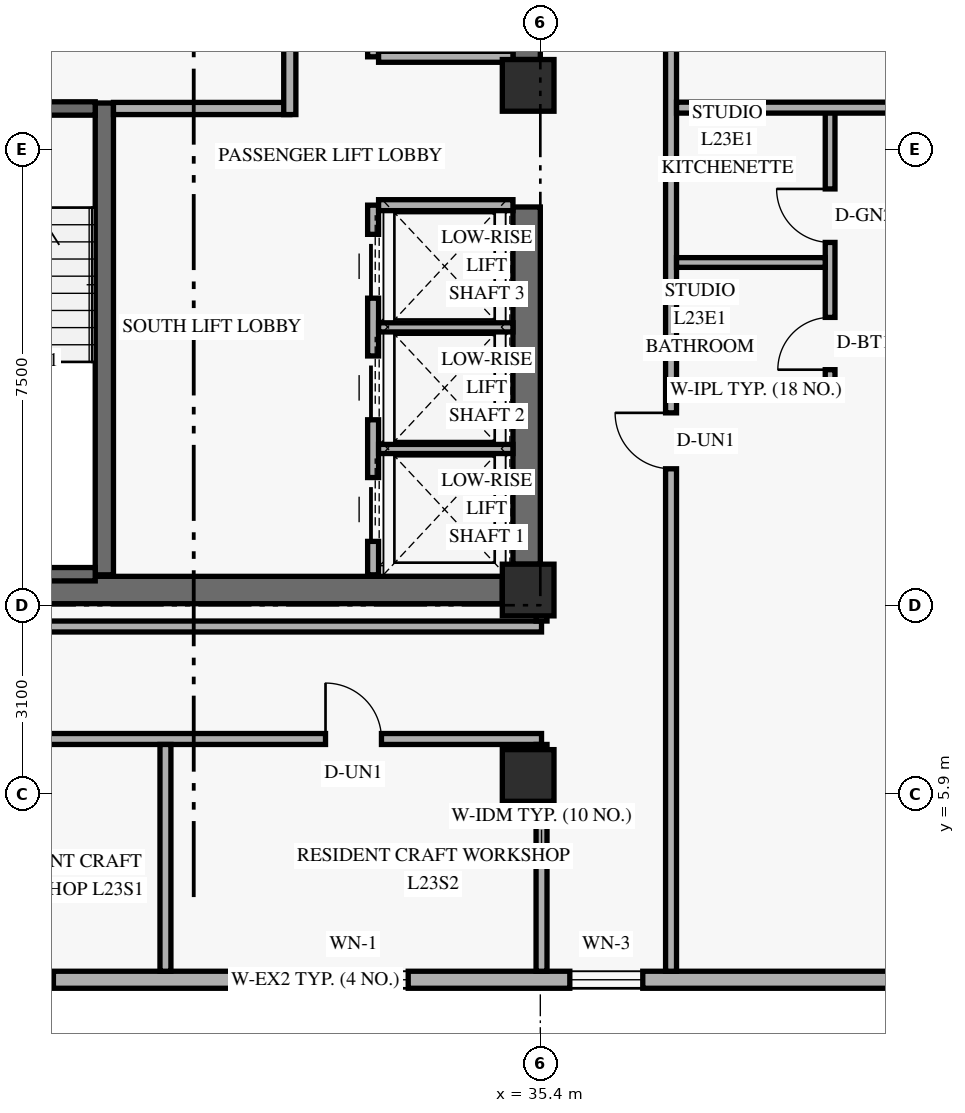
"""IFC4 building model, lengths in metres.
Left out: names, types, materials, properties, quantities, classifications, styles, units other than length and angle.
Written with IfcOpenShell. Run it as: python <this file> out.ifc"""

import sys

from ifc_helpers import new_model, si_unit, direction, frame, frame_2d, origin, origin_2d, place, context, subcontext, project, spatial, rectangle, extrude, element, fill, save


model = new_model("IFC4")
c1 = context("Model", 3, precision=1e-05, world=origin(), true_north=direction((0.0, 1.0)))
c2 = subcontext(c1, "Body", "Model", "MODEL_VIEW")
j1 = project(units=[si_unit("LENGTHUNIT", "METRE"), si_unit("PLANEANGLEUNIT", "RADIAN")], contexts=[c1])
p1 = place(None, origin())
s1 = spatial("IfcSite", under=j1, at=p1, CompositionType="ELEMENT")
p2 = place(p1, origin())
s2 = spatial("IfcBuilding", under=s1, at=p2, CompositionType="ELEMENT")
p3 = place(p2, frame((0.0, 0.0, 91.2)))
s3 = spatial("IfcBuildingStorey", under=s2, at=p3, CompositionType="ELEMENT", Elevation=91.2)
p4 = place(p3, frame((35.175, 9.675, 0.0), z_axis=(0.0, 0.0, 1.0), x_axis=(0.0, 1.0, 0.0)))
e1 = element("IfcWall", 1, at=p4, inside=s3, PredefinedType="SHEAR", context=c2, shape_type="SweptSolid", body=[
    extrude(rectangle(XDim=5.875, YDim=0.45, at=frame_2d((2.938, 0.0))), origin(), (0.0, 0.0, 1.0), 2.749),
])
p5 = place(p3, frame((35.175, 17.975, 0.0), z_axis=(0.0, 0.0, 1.0), x_axis=(0.0, 1.0, 0.0)))
e2 = element("IfcWall", 2, at=p5, inside=s3, PredefinedType="SHEAR", context=c2, shape_type="SweptSolid", body=[
    extrude(rectangle(XDim=10.125, YDim=0.45, at=frame_2d((5.062, 0.0))), origin(), (0.0, 0.0, 1.0), 2.749),
])
p6 = place(p3, frame((24.625, 9.25, 0.0), z_axis=(0.0, 0.0, 1.0), x_axis=(1.0, 0.0, 0.0)))
e3 = element("IfcWall", 3, at=p6, inside=s3, PredefinedType="SHEAR", context=c2, shape_type="SweptSolid", body=[
    extrude(rectangle(XDim=10.15, YDim=0.45, at=frame_2d((5.075, 0.0))), origin(), (0.0, 0.0, 1.0), 3.36),
])
p7 = place(p3, frame((28.23, 9.5, 0.0), z_axis=(0.0, 0.0, 1.0), x_axis=(0.0, 1.0, 0.0)))
e4 = element("IfcWall", 4, at=p7, inside=s3, PredefinedType="SHEAR", context=c2, shape_type="SweptSolid", body=[
    extrude(rectangle(XDim=7.76, YDim=0.3, at=frame_2d((3.88, 0.0))), origin(), (0.0, 0.0, 1.0), 3.36),
])
p8 = place(p3, frame((24.92, 9.51, 0.0), z_axis=(0.0, 0.0, 1.0), x_axis=(1.0, 0.0, 0.0)))
e5 = element("IfcWall", 5, at=p8, inside=s3, PredefinedType="SHEAR", context=c2, shape_type="SweptSolid", body=[
    extrude(rectangle(XDim=3.16, YDim=0.22, at=frame_2d((1.58, 0.0))), origin(), (0.0, 0.0, 1.0), 3.36),
])
p9 = place(p3, frame((24.92, 17.17, 0.0), z_axis=(0.0, 0.0, 1.0), x_axis=(1.0, 0.0, 0.0)))
e6 = element("IfcWall", 6, at=p9, inside=s3, PredefinedType="SHEAR", context=c2, shape_type="SweptSolid", body=[
    extrude(rectangle(XDim=3.16, YDim=0.22, at=frame_2d((1.58, 0.0))), origin(), (0.0, 0.0, 1.0), 3.36),
])
p10 = place(p9, frame((0.78, 0.0, 0.0)))
e7 = element("IfcOpeningElement", 7, at=p10, cuts=e6, PredefinedType="OPENING", context=c2, shape_type="SweptSolid", body=[
    extrude(rectangle(XDim=1.05, YDim=2.15, at=frame_2d((0.525, 1.075))), frame((0.0, 0.12, 0.0), z_axis=(0.0, -1.0, 0.0), x_axis=(1.0, 0.0, 0.0)), (0.0, 0.0, 1.0), 0.24),
])
for number, where, z_axis, x_axis in (
    (8, (35.2, 6.2, 0.0), (0.0, 0.0, 1.0), (1.0, 0.0, 0.0)),
    (9, (35.2, 9.25, 0.0), (0.0, 0.0, 1.0), (1.0, 0.0, 0.0)),
    (10, (35.2, 17.55, 0.0), (0.0, 0.0, 1.0), (1.0, 0.0, 0.0)),
):
    element("IfcColumn", number, at=place(p3, frame(where, z_axis=z_axis, x_axis=x_axis)), inside=s3, PredefinedType="COLUMN", context=c2, shape_type="SweptSolid", body=[
        extrude(rectangle(XDim=0.85, YDim=0.85, at=origin_2d()), origin(), (0.0, 0.0, 1.0), 3.6),
    ])
p11 = place(p3, frame((13.42, 2.84, 0.0), z_axis=(0.0, 0.0, 1.0), x_axis=(1.0, 0.0, 0.0)))
e11 = element("IfcWall", 11, at=p11, inside=s3, PredefinedType="SOLIDWALL", context=c2, shape_type="SweptSolid", body=[
    extrude(rectangle(XDim=36.56, YDim=0.28, at=frame_2d((18.28, 0.0))), origin(), (0.0, 0.0, 1.0), 3.36),
])
p12 = place(p11, frame((3.215, 0.0, 0.85)))
e12 = element("IfcOpeningElement", 12, at=p12, cuts=e11, PredefinedType="OPENING", context=c2, shape_type="SweptSolid", body=[
    extrude(rectangle(XDim=1.8, YDim=1.6, at=frame_2d((0.9, 0.8))), frame((0.0, 0.15, 0.0), z_axis=(0.0, -1.0, 0.0), x_axis=(1.0, 0.0, 0.0)), (0.0, 0.0, 1.0), 0.3),
])
p13 = place(p11, frame((8.68, 0.0, 0.85)))
e13 = element("IfcOpeningElement", 13, at=p13, cuts=e11, PredefinedType="OPENING", context=c2, shape_type="SweptSolid", body=[
    extrude(rectangle(XDim=1.2, YDim=1.5, at=frame_2d((0.6, 0.75))), frame((0.0, 0.15, 0.0), z_axis=(0.0, -1.0, 0.0), x_axis=(1.0, 0.0, 0.0)), (0.0, 0.0, 1.0), 0.3),
])
p14 = place(p11, frame((12.172, 0.0, 0.85)))
e14 = element("IfcOpeningElement", 14, at=p14, cuts=e11, PredefinedType="OPENING", context=c2, shape_type="SweptSolid", body=[
    extrude(rectangle(XDim=1.8, YDim=1.6, at=frame_2d((0.9, 0.8))), frame((0.0, 0.15, 0.0), z_axis=(0.0, -1.0, 0.0), x_axis=(1.0, 0.0, 0.0)), (0.0, 0.0, 1.0), 0.3),
])
p15 = place(p11, frame((18.008, 0.0, 0.85)))
e15 = element("IfcOpeningElement", 15, at=p15, cuts=e11, PredefinedType="OPENING", context=c2, shape_type="SweptSolid", body=[
    extrude(rectangle(XDim=1.8, YDim=1.6, at=frame_2d((0.9, 0.8))), frame((0.0, 0.15, 0.0), z_axis=(0.0, -1.0, 0.0), x_axis=(1.0, 0.0, 0.0)), (0.0, 0.0, 1.0), 0.3),
])
p16 = place(p11, frame((22.465, 0.0, 0.85)))
e16 = element("IfcOpeningElement", 16, at=p16, cuts=e11, PredefinedType="OPENING", context=c2, shape_type="SweptSolid", body=[
    extrude(rectangle(XDim=1.2, YDim=1.5, at=frame_2d((0.6, 0.75))), frame((0.0, 0.15, 0.0), z_axis=(0.0, -1.0, 0.0), x_axis=(1.0, 0.0, 0.0)), (0.0, 0.0, 1.0), 0.3),
])
p17 = place(p11, frame((29.445, 0.0, 0.85)))
e17 = element("IfcOpeningElement", 17, at=p17, cuts=e11, PredefinedType="OPENING", context=c2, shape_type="SweptSolid", body=[
    extrude(rectangle(XDim=1.8, YDim=1.6, at=frame_2d((0.9, 0.8))), frame((0.0, 0.15, 0.0), z_axis=(0.0, -1.0, 0.0), x_axis=(1.0, 0.0, 0.0)), (0.0, 0.0, 1.0), 0.3),
])
p18 = place(p3, frame((28.38, 17.17, 0.0), z_axis=(0.0, 0.0, 1.0), x_axis=(1.0, 0.0, 0.0)))
e18 = element("IfcWall", 18, at=p18, inside=s3, PredefinedType="STANDARD", context=c2, shape_type="SweptSolid", body=[
    extrude(rectangle(XDim=2.9, YDim=0.2, at=frame_2d((1.45, 0.0))), origin(), (0.0, 0.0, 1.0), 3.36),
])
p19 = place(p3, frame((31.28, 17.07, 0.0), z_axis=(0.0, 0.0, 1.0), x_axis=(0.0, 1.0, 0.0)))
e19 = element("IfcWall", 19, at=p19, inside=s3, PredefinedType="STANDARD", context=c2, shape_type="SweptSolid", body=[
    extrude(rectangle(XDim=3.92, YDim=0.2, at=frame_2d((1.96, 0.0))), origin(), (0.0, 0.0, 1.0), 2.731),
])
p20 = place(p19, frame((1.35, 0.0, 0.0)))
e20 = element("IfcOpeningElement", 20, at=p20, cuts=e19, PredefinedType="OPENING", context=c2, shape_type="SweptSolid", body=[
    extrude(rectangle(XDim=1.2, YDim=2.15, at=frame_2d((0.6, 1.075))), frame((0.0, 0.11, 0.0), z_axis=(0.0, -1.0, 0.0), x_axis=(1.0, 0.0, 0.0)), (0.0, 0.0, 1.0), 0.22),
])
p21 = place(p3, frame((32.65, 9.5, 0.0), z_axis=(0.0, 0.0, 1.0), x_axis=(0.0, 1.0, 0.0)))
e21 = element("IfcWall", 21, at=p21, inside=s3, PredefinedType="STANDARD", context=c2, shape_type="SweptSolid", body=[
    extrude(rectangle(XDim=6.08, YDim=0.18, at=frame_2d((3.04, 0.0))), origin(), (0.0, 0.0, 1.0), 3.36),
])
p22 = place(p21, frame((0.55, 0.0, 0.0)))
e22 = element("IfcOpeningElement", 22, at=p22, cuts=e21, PredefinedType="OPENING", context=c2, shape_type="SweptSolid", body=[
    extrude(rectangle(XDim=1.05, YDim=2.2, at=frame_2d((0.525, 1.1))), frame((0.0, 0.1, 0.0), z_axis=(0.0, -1.0, 0.0), x_axis=(1.0, 0.0, 0.0)), (0.0, 0.0, 1.0), 0.2),
])
p23 = place(p21, frame((2.55, 0.0, 0.0)))
e23 = element("IfcOpeningElement", 23, at=p23, cuts=e21, PredefinedType="OPENING", context=c2, shape_type="SweptSolid", body=[
    extrude(rectangle(XDim=1.05, YDim=2.2, at=frame_2d((0.525, 1.1))), frame((0.0, 0.1, 0.0), z_axis=(0.0, -1.0, 0.0), x_axis=(1.0, 0.0, 0.0)), (0.0, 0.0, 1.0), 0.2),
])
p24 = place(p21, frame((4.55, 0.0, 0.0)))
e24 = element("IfcOpeningElement", 24, at=p24, cuts=e21, PredefinedType="OPENING", context=c2, shape_type="SweptSolid", body=[
    extrude(rectangle(XDim=1.05, YDim=2.2, at=frame_2d((0.525, 1.1))), frame((0.0, 0.1, 0.0), z_axis=(0.0, -1.0, 0.0), x_axis=(1.0, 0.0, 0.0)), (0.0, 0.0, 1.0), 0.2),
])
p25 = place(p3, frame((32.74, 15.58, 0.0), z_axis=(0.0, 0.0, 1.0), x_axis=(1.0, 0.0, 0.0)))
e25 = element("IfcWall", 25, at=p25, inside=s3, PredefinedType="STANDARD", context=c2, shape_type="SweptSolid", body=[
    extrude(rectangle(XDim=2.21, YDim=0.18, at=frame_2d((1.105, 0.0))), origin(), (0.0, 0.0, 1.0), 3.36),
])
for number, where, z_axis, x_axis in (
    (26, (32.74, 11.57, 0.0), (0.0, 0.0, 1.0), (1.0, 0.0, 0.0)),
    (27, (32.74, 13.57, 0.0), (0.0, 0.0, 1.0), (1.0, 0.0, 0.0)),
):
    element("IfcWall", number, at=place(p3, frame(where, z_axis=z_axis, x_axis=x_axis)), inside=s3, PredefinedType="STANDARD", context=c2, shape_type="SweptSolid", body=[
        extrude(rectangle(XDim=2.21, YDim=0.15, at=frame_2d((1.105, 0.0))), origin(), (0.0, 0.0, 1.0), 3.36),
    ])
p26 = place(p3, frame((32.65, 18.02, 0.0), z_axis=(0.0, 0.0, 1.0), x_axis=(0.0, 1.0, 0.0)))
e28 = element("IfcWall", 28, at=p26, inside=s3, PredefinedType="STANDARD", context=c2, shape_type="SweptSolid", body=[
    extrude(rectangle(XDim=10.06, YDim=0.18, at=frame_2d((5.03, 0.0))), origin(), (0.0, 0.0, 1.0), 3.36),
])
p27 = place(p3, frame((32.74, 18.02, 0.0), z_axis=(0.0, 0.0, 1.0), x_axis=(1.0, 0.0, 0.0)))
e29 = element("IfcWall", 29, at=p27, inside=s3, PredefinedType="STANDARD", context=c2, shape_type="SweptSolid", body=[
    extrude(rectangle(XDim=2.21, YDim=0.18, at=frame_2d((1.105, 0.0))), origin(), (0.0, 0.0, 1.0), 3.36),
])
p28 = place(p3, frame((37.55, 2.98, 0.0), z_axis=(0.0, 0.0, 1.0), x_axis=(0.0, 1.0, 0.0)))
e30 = element("IfcWall", 30, at=p28, inside=s3, PredefinedType="STANDARD", context=c2, shape_type="SweptSolid", body=[
    extrude(rectangle(XDim=42.04, YDim=0.18, at=frame_2d((21.02, 0.0))), origin(), (0.0, 0.0, 1.0), 2.731),
])
p29 = place(p28, frame((8.264, 0.0, 0.0)))
e31 = element("IfcOpeningElement", 31, at=p29, cuts=e30, PredefinedType="OPENING", context=c2, shape_type="SweptSolid", body=[
    extrude(rectangle(XDim=0.92, YDim=2.15, at=frame_2d((0.46, 1.075))), frame((0.0, 0.1, 0.0), z_axis=(0.0, -1.0, 0.0), x_axis=(1.0, 0.0, 0.0)), (0.0, 0.0, 1.0), 0.2),
])
p30 = place(p28, frame((18.691, 0.0, 0.0)))
e32 = element("IfcOpeningElement", 32, at=p30, cuts=e30, PredefinedType="OPENING", context=c2, shape_type="SweptSolid", body=[
    extrude(rectangle(XDim=0.92, YDim=2.15, at=frame_2d((0.46, 1.075))), frame((0.0, 0.1, 0.0), z_axis=(0.0, -1.0, 0.0), x_axis=(1.0, 0.0, 0.0)), (0.0, 0.0, 1.0), 0.2),
])
p31 = place(p28, frame((32.494, 0.0, 0.0)))
e33 = element("IfcOpeningElement", 33, at=p31, cuts=e30, PredefinedType="OPENING", context=c2, shape_type="SweptSolid", body=[
    extrude(rectangle(XDim=0.92, YDim=2.15, at=frame_2d((0.46, 1.075))), frame((0.0, 0.1, 0.0), z_axis=(0.0, -1.0, 0.0), x_axis=(1.0, 0.0, 0.0)), (0.0, 0.0, 1.0), 0.2),
])
p32 = place(p3, frame((23.75, 6.8, 0.0), z_axis=(0.0, 0.0, 1.0), x_axis=(1.0, 0.0, 0.0)))
e34 = element("IfcWall", 34, at=p32, inside=s3, PredefinedType="STANDARD", context=c2, shape_type="SweptSolid", body=[
    extrude(rectangle(XDim=11.67, YDim=0.18, at=frame_2d((5.835, 0.0))), origin(), (0.0, 0.0, 1.0), 2.731),
])
p33 = place(p32, frame((2.282, 0.0, 0.0)))
e35 = element("IfcOpeningElement", 35, at=p33, cuts=e34, PredefinedType="OPENING", context=c2, shape_type="SweptSolid", body=[
    extrude(rectangle(XDim=0.92, YDim=2.15, at=frame_2d((0.46, 1.075))), frame((0.0, 0.1, 0.0), z_axis=(0.0, -1.0, 0.0), x_axis=(1.0, 0.0, 0.0)), (0.0, 0.0, 1.0), 0.2),
])
p34 = place(p32, frame((8.117, 0.0, 0.0)))
e36 = element("IfcOpeningElement", 36, at=p34, cuts=e34, PredefinedType="OPENING", context=c2, shape_type="SweptSolid", body=[
    extrude(rectangle(XDim=0.92, YDim=2.15, at=frame_2d((0.46, 1.075))), frame((0.0, 0.1, 0.0), z_axis=(0.0, -1.0, 0.0), x_axis=(1.0, 0.0, 0.0)), (0.0, 0.0, 1.0), 0.2),
])
p35 = place(p3, frame((23.75, 8.65, 0.0), z_axis=(0.0, 0.0, 1.0), x_axis=(1.0, 0.0, 0.0)))
e37 = element("IfcWall", 37, at=p35, inside=s3, PredefinedType="STANDARD", context=c2, shape_type="SweptSolid", body=[
    extrude(rectangle(XDim=11.67, YDim=0.18, at=frame_2d((5.835, 0.0))), origin(), (0.0, 0.0, 1.0), 2.731),
])
p36 = place(p3, frame((35.42, 2.98, 0.0), z_axis=(0.0, 0.0, 1.0), x_axis=(0.0, 1.0, 0.0)))
e38 = element("IfcWall", 38, at=p36, inside=s3, PredefinedType="PARTITIONING", context=c2, shape_type="SweptSolid", body=[
    extrude(rectangle(XDim=3.73, YDim=0.18, at=frame_2d((1.865, 0.0))), origin(), (0.0, 0.0, 1.0), 2.731),
])
p37 = place(p3, frame((35.42, 8.74, 0.0), z_axis=(0.0, 0.0, 1.0), x_axis=(0.0, 1.0, 0.0)))
e39 = element("IfcWall", 39, at=p37, inside=s3, PredefinedType="STANDARD", context=c2, shape_type="SweptSolid", body=[
    extrude(rectangle(XDim=0.51, YDim=0.18, at=frame_2d((0.255, 0.0))), origin(), (0.0, 0.0, 1.0), 2.731),
])
p38 = place(p3, frame((37.64, 12.544, 0.0), z_axis=(0.0, 0.0, 1.0), x_axis=(1.0, 0.0, 0.0)))
e40 = element("IfcWall", 40, at=p38, inside=s3, PredefinedType="PLUMBINGWALL", context=c2, shape_type="SweptSolid", body=[
    extrude(rectangle(XDim=2.606, YDim=0.16, at=frame_2d((1.303, 0.0))), origin(), (0.0, 0.0, 1.0), 3.36),
])
p39 = place(p3, frame((40.166, 12.454, 0.0), z_axis=(0.0, 0.0, 1.0), x_axis=(0.0, 1.0, 0.0)))
e41 = element("IfcWall", 41, at=p39, inside=s3, PredefinedType="PLUMBINGWALL", context=c2, shape_type="SweptSolid", body=[
    extrude(rectangle(XDim=4.73, YDim=0.16, at=frame_2d((2.365, 0.0))), origin(), (0.0, 0.0, 1.0), 2.988),
])
p40 = place(p39, frame((0.42, 0.0, 0.0)))
e42 = element("IfcOpeningElement", 42, at=p40, cuts=e41, PredefinedType="OPENING", context=c2, shape_type="SweptSolid", body=[
    extrude(rectangle(XDim=0.86, YDim=2.12, at=frame_2d((0.43, 1.06))), frame((0.0, 0.09, 0.0), z_axis=(0.0, -1.0, 0.0), x_axis=(1.0, 0.0, 0.0)), (0.0, 0.0, 1.0), 0.18),
])
p41 = place(p39, frame((2.513, 0.0, 0.0)))
e43 = element("IfcOpeningElement", 43, at=p41, cuts=e41, PredefinedType="OPENING", context=c2, shape_type="SweptSolid", body=[
    extrude(rectangle(XDim=0.88, YDim=2.12, at=frame_2d((0.44, 1.06))), frame((0.0, 0.09, 0.0), z_axis=(0.0, -1.0, 0.0), x_axis=(1.0, 0.0, 0.0)), (0.0, 0.0, 1.0), 0.18),
])
p42 = place(p3, frame((37.64, 14.637, 0.0), z_axis=(0.0, 0.0, 1.0), x_axis=(1.0, 0.0, 0.0)))
e44 = element("IfcWall", 44, at=p42, inside=s3, PredefinedType="PLUMBINGWALL", context=c2, shape_type="SweptSolid", body=[
    extrude(rectangle(XDim=2.446, YDim=0.16, at=frame_2d((1.223, 0.0))), origin(), (0.0, 0.0, 1.0), 3.36),
])
p43 = place(p3, frame((37.64, 17.184, 0.0), z_axis=(0.0, 0.0, 1.0), x_axis=(1.0, 0.0, 0.0)))
e45 = element("IfcWall", 45, at=p43, inside=s3, PredefinedType="PARTITIONING", context=c2, shape_type="SweptSolid", body=[
    extrude(rectangle(XDim=15.68, YDim=0.18, at=frame_2d((7.84, 0.0))), origin(), (0.0, 0.0, 1.0), 2.731),
])
p44 = place(p3, frame((29.235, 2.98, 0.0), z_axis=(0.0, 0.0, 1.0), x_axis=(0.0, 1.0, 0.0)))
e46 = element("IfcWall", 46, at=p44, inside=s3, PredefinedType="PARTITIONING", context=c2, shape_type="SweptSolid", body=[
    extrude(rectangle(XDim=3.73, YDim=0.18, at=frame_2d((1.865, 0.0))), origin(), (0.0, 0.0, 1.0), 2.809),
])
p45 = place(p14, origin())
e47 = element("IfcWindow", 47, at=p45, inside=s3, PartitioningType="SINGLE_PANEL", PredefinedType="WINDOW", context=c2, shape_type="SweptSolid", body=[
    extrude(rectangle(XDim=1.8, YDim=1.6, at=frame_2d((0.9, 0.8))), frame((0.0, 0.03, 0.0), z_axis=(0.0, -1.0, 0.0), x_axis=(1.0, 0.0, 0.0)), (0.0, 0.0, 1.0), 0.06),
])
fill(e14, e47)
p46 = place(p15, origin())
e48 = element("IfcWindow", 48, at=p46, inside=s3, PartitioningType="SINGLE_PANEL", PredefinedType="WINDOW", context=c2, shape_type="SweptSolid", body=[
    extrude(rectangle(XDim=1.8, YDim=1.6, at=frame_2d((0.9, 0.8))), frame((0.0, 0.03, 0.0), z_axis=(0.0, -1.0, 0.0), x_axis=(1.0, 0.0, 0.0)), (0.0, 0.0, 1.0), 0.06),
])
fill(e15, e48)
p47 = place(p16, origin())
e49 = element("IfcWindow", 49, at=p47, inside=s3, PartitioningType="SINGLE_PANEL", PredefinedType="WINDOW", context=c2, shape_type="SweptSolid", body=[
    extrude(rectangle(XDim=1.2, YDim=1.5, at=frame_2d((0.6, 0.75))), frame((0.0, 0.03, 0.0), z_axis=(0.0, -1.0, 0.0), x_axis=(1.0, 0.0, 0.0)), (0.0, 0.0, 1.0), 0.06),
])
fill(e16, e49)
p48 = place(p22, origin())
e50 = element("IfcDoor", 50, at=p48, inside=s3, OperationType="SLIDING_TO_LEFT", PredefinedType="DOOR", context=c2, shape_type="SweptSolid", body=[
    extrude(rectangle(XDim=1.05, YDim=2.2, at=frame_2d((0.525, 1.1))), frame((0.0, 0.025, 0.0), z_axis=(0.0, -1.0, 0.0), x_axis=(1.0, 0.0, 0.0)), (0.0, 0.0, 1.0), 0.05),
])
fill(e22, e50)
p49 = place(p23, origin())
e51 = element("IfcDoor", 51, at=p49, inside=s3, OperationType="SLIDING_TO_LEFT", PredefinedType="DOOR", context=c2, shape_type="SweptSolid", body=[
    extrude(rectangle(XDim=1.05, YDim=2.2, at=frame_2d((0.525, 1.1))), frame((0.0, 0.025, 0.0), z_axis=(0.0, -1.0, 0.0), x_axis=(1.0, 0.0, 0.0)), (0.0, 0.0, 1.0), 0.05),
])
fill(e23, e51)
p50 = place(p24, origin())
e52 = element("IfcDoor", 52, at=p50, inside=s3, OperationType="SLIDING_TO_LEFT", PredefinedType="DOOR", context=c2, shape_type="SweptSolid", body=[
    extrude(rectangle(XDim=1.05, YDim=2.2, at=frame_2d((0.525, 1.1))), frame((0.0, 0.025, 0.0), z_axis=(0.0, -1.0, 0.0), x_axis=(1.0, 0.0, 0.0)), (0.0, 0.0, 1.0), 0.05),
])
fill(e24, e52)
p51 = place(p29, origin())
e53 = element("IfcDoor", 53, at=p51, inside=s3, OperationType="SINGLE_SWING_RIGHT", PredefinedType="DOOR", context=c2, shape_type="SweptSolid", body=[
    extrude(rectangle(XDim=0.92, YDim=2.15, at=frame_2d((0.46, 1.075))), frame((0.0, 0.025, 0.0), z_axis=(0.0, -1.0, 0.0), x_axis=(1.0, 0.0, 0.0)), (0.0, 0.0, 1.0), 0.05),
])
fill(e31, e53)
p52 = place(p40, origin())
e54 = element("IfcDoor", 54, at=p52, inside=s3, OperationType="SINGLE_SWING_LEFT", PredefinedType="DOOR", context=c2, shape_type="SweptSolid", body=[
    extrude(rectangle(XDim=0.86, YDim=2.12, at=frame_2d((0.43, 1.06))), frame((0.0, 0.025, 0.0), z_axis=(0.0, -1.0, 0.0), x_axis=(1.0, 0.0, 0.0)), (0.0, 0.0, 1.0), 0.05),
])
fill(e42, e54)
p53 = place(p41, origin())
e55 = element("IfcDoor", 55, at=p53, inside=s3, OperationType="SINGLE_SWING_RIGHT", PredefinedType="DOOR", context=c2, shape_type="SweptSolid", body=[
    extrude(rectangle(XDim=0.88, YDim=2.12, at=frame_2d((0.44, 1.06))), frame((0.0, 0.025, 0.0), z_axis=(0.0, -1.0, 0.0), x_axis=(1.0, 0.0, 0.0)), (0.0, 0.0, 1.0), 0.05),
])
fill(e43, e55)
p54 = place(p34, origin())
e56 = element("IfcDoor", 56, at=p54, inside=s3, OperationType="SINGLE_SWING_LEFT", PredefinedType="DOOR", context=c2, shape_type="SweptSolid", body=[
    extrude(rectangle(XDim=0.92, YDim=2.15, at=frame_2d((0.46, 1.075))), frame((0.0, 0.025, 0.0), z_axis=(0.0, -1.0, 0.0), x_axis=(1.0, 0.0, 0.0)), (0.0, 0.0, 1.0), 0.05),
])
fill(e36, e56)
save(model, sys.argv[1])
